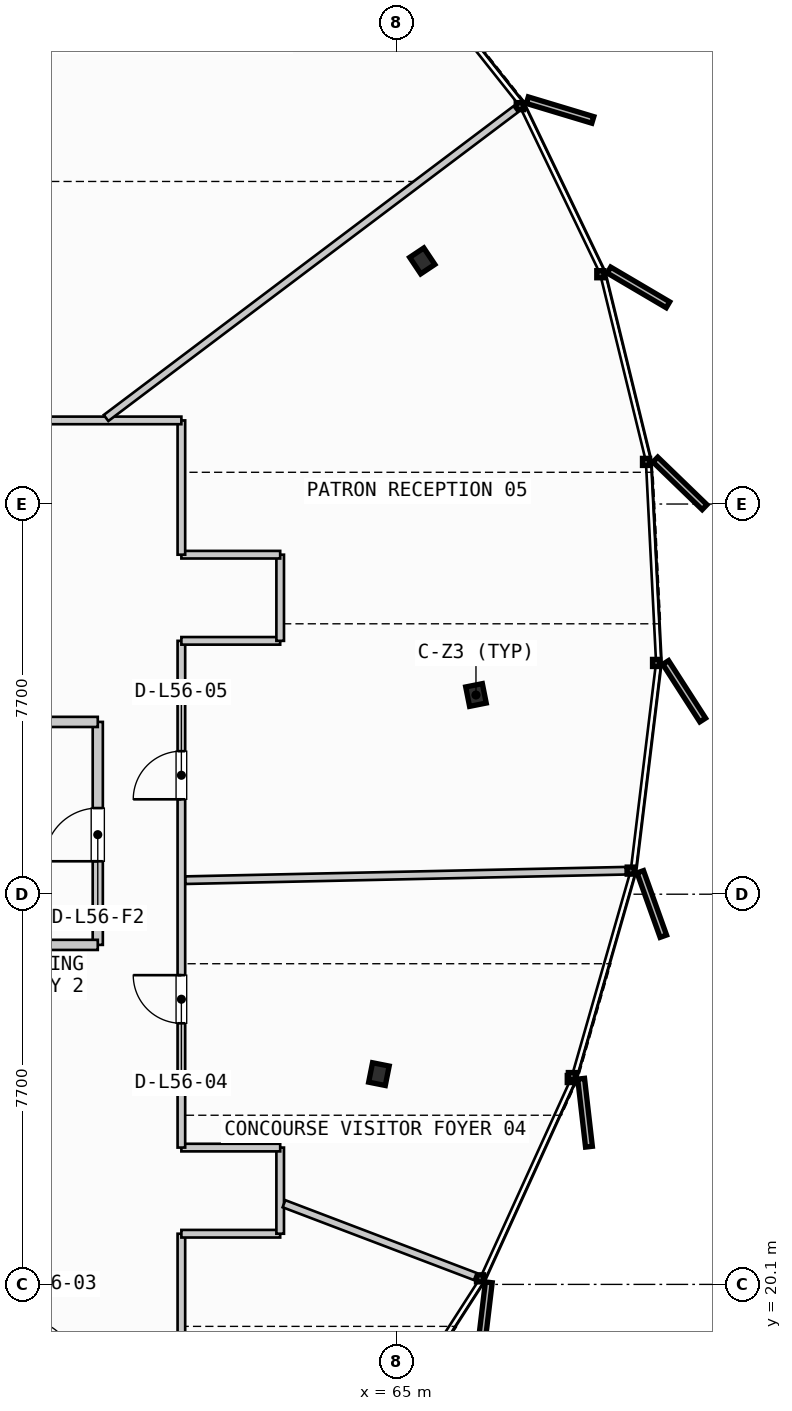
"""IFC4 building model, lengths in metres.
Left out: names, types, materials, properties, quantities, classifications, styles, units other than length and angle.
Written with IfcOpenShell. Run it as: python <this file> out.ifc"""

import sys

from ifc_helpers import new_model, si_unit, direction, frame, frame_2d, origin, origin_2d, place, context, subcontext, project, spatial, rectangle, i_section, extrude, source, transform, mapped, element, fill, save


model = new_model("IFC4")
c1 = context("Model", 3, precision=1e-05, world=origin(), true_north=direction((0.0, 1.0)))
c2 = subcontext(c1, "Body", "Model", "MODEL_VIEW")
j1 = project(units=[si_unit("LENGTHUNIT", "METRE"), si_unit("PLANEANGLEUNIT", "RADIAN")], contexts=[c1])
p1 = place(None, origin())
s1 = spatial("IfcSite", under=j1, at=p1, CompositionType="ELEMENT")
p2 = place(p1, origin())
s2 = spatial("IfcBuilding", under=s1, at=p2, CompositionType="ELEMENT")
p3 = place(p2, frame((0.0, 0.0, 214.9)))
s3 = spatial("IfcBuildingStorey", under=s2, at=p3, CompositionType="ELEMENT", Elevation=214.9)
m1 = source(origin(), c2, "Body", "SweptSolid", [
    extrude(i_section(OverallWidth=0.391, OverallDepth=0.335, WebThickness=0.023, FlangeThickness=0.034, FilletRadius=0.015, at=origin_2d()), origin(), (0.0, 0.0, 1.0), 3.24),
])
for number, where, z_axis, x_axis in (
    (1, (66.564, 31.731, 0.0), (0.0, 0.0, 1.0), (0.981, 0.195, 0.0)),
    (2, (65.504, 40.298, 0.0), (0.0, 0.0, 1.0), (0.831, 0.556, 0.0)),
    (3, (64.649, 24.25, 0.0), (0.0, 0.0, 1.0), (0.981, -0.195, 0.0)),
):
    element("IfcColumn", number, at=place(p3, frame(where, z_axis=z_axis, x_axis=x_axis)), inside=s3, PredefinedType="COLUMN", context=c2, shape_type="MappedRepresentation", body=[
        mapped(m1, transform((0.0, 0.0, 0.0), scale=1.0)),
    ])
p4 = place(p3, frame((59.1, 26.8, 0.0), z_axis=(0.0, 0.0, 1.0), x_axis=(0.0, 1.0, 0.0)))
e4 = element("IfcWall", 4, at=p4, inside=s3, PredefinedType="PARTITIONING", context=c2, shape_type="SweptSolid", body=[
    extrude(rectangle(XDim=4.4, YDim=0.2, at=frame_2d((2.2, 0.0))), origin(), (0.0, 0.0, 1.0), 2.295),
])
p5 = place(p4, frame((1.65, 0.0, 0.0)))
e5 = element("IfcOpeningElement", 5, at=p5, cuts=e4, PredefinedType="OPENING", context=c2, shape_type="SweptSolid", body=[
    extrude(rectangle(XDim=1.05, YDim=2.15, at=frame_2d((0.525, 1.075))), frame((0.0, 0.11, 0.0), z_axis=(0.0, -1.0, 0.0), x_axis=(1.0, 0.0, 0.0)), (0.0, 0.0, 1.0), 0.22),
])
for number, where, z_axis, x_axis in (
    (6, (55.885, 26.8, 0.0), (0.0, 0.0, 1.0), (1.0, 0.0, 0.0)),
    (7, (55.885, 31.2, 0.0), (0.0, 0.0, 1.0), (1.0, 0.0, 0.0)),
):
    element("IfcWall", number, at=place(p3, frame(where, z_axis=z_axis, x_axis=x_axis)), inside=s3, PredefinedType="PARTITIONING", context=c2, shape_type="SweptSolid", body=[
        extrude(rectangle(XDim=3.215, YDim=0.2, at=frame_2d((1.607, 0.0))), origin(), (0.0, 0.0, 1.0), 2.295),
    ])
p6 = place(p3, frame((60.75, 18.45, 0.0), z_axis=(0.0, 0.0, 1.0), x_axis=(0.0, 1.0, 0.0)))
e8 = element("IfcWall", 8, at=p6, inside=s3, PredefinedType="PARTITIONING", context=c2, shape_type="SweptSolid", body=[
    extrude(rectangle(XDim=2.65, YDim=0.15, at=frame_2d((1.325, 0.0))), origin(), (0.0, 0.0, 1.0), 2.295),
])
p7 = place(p3, frame((60.75, 21.1, 0.0), z_axis=(0.0, 0.0, 1.0), x_axis=(1.0, 0.0, 0.0)))
e9 = element("IfcWall", 9, at=p7, inside=s3, PredefinedType="PARTITIONING", context=c2, shape_type="SweptSolid", body=[
    extrude(rectangle(XDim=1.95, YDim=0.15, at=frame_2d((0.975, 0.0))), origin(), (0.0, 0.0, 1.0), 2.295),
])
p8 = place(p3, frame((62.7, 21.1, 0.0), z_axis=(0.0, 0.0, 1.0), x_axis=(0.0, 1.0, 0.0)))
e10 = element("IfcWall", 10, at=p8, inside=s3, PredefinedType="PARTITIONING", context=c2, shape_type="SweptSolid", body=[
    extrude(rectangle(XDim=1.7, YDim=0.15, at=frame_2d((0.85, 0.0))), origin(), (0.0, 0.0, 1.0), 2.295),
])
p9 = place(p3, frame((62.7, 22.8, 0.0), z_axis=(0.0, 0.0, 1.0), x_axis=(-1.0, 0.0, 0.0)))
e11 = element("IfcWall", 11, at=p9, inside=s3, PredefinedType="PARTITIONING", context=c2, shape_type="SweptSolid", body=[
    extrude(rectangle(XDim=1.95, YDim=0.15, at=frame_2d((0.975, 0.0))), origin(), (0.0, 0.0, 1.0), 2.295),
])
p10 = place(p3, frame((60.75, 22.8, 0.0), z_axis=(0.0, 0.0, 1.0), x_axis=(0.0, 1.0, 0.0)))
e12 = element("IfcWall", 12, at=p10, inside=s3, PredefinedType="PARTITIONING", context=c2, shape_type="SweptSolid", body=[
    extrude(rectangle(XDim=10.0, YDim=0.15, at=frame_2d((5.0, 0.0))), origin(), (0.0, 0.0, 1.0), 2.295),
])
p11 = place(p10, frame((2.453, 0.0, 0.0)))
e13 = element("IfcOpeningElement", 13, at=p11, cuts=e12, PredefinedType="OPENING", context=c2, shape_type="SweptSolid", body=[
    extrude(rectangle(XDim=0.95, YDim=2.15, at=frame_2d((0.475, 1.075))), frame((0.0, 0.085, 0.0), z_axis=(0.0, -1.0, 0.0), x_axis=(1.0, 0.0, 0.0)), (0.0, 0.0, 1.0), 0.17),
])
p12 = place(p10, frame((6.873, 0.0, 0.0)))
e14 = element("IfcOpeningElement", 14, at=p12, cuts=e12, PredefinedType="OPENING", context=c2, shape_type="SweptSolid", body=[
    extrude(rectangle(XDim=0.95, YDim=2.15, at=frame_2d((0.475, 1.075))), frame((0.0, 0.085, 0.0), z_axis=(0.0, -1.0, 0.0), x_axis=(1.0, 0.0, 0.0)), (0.0, 0.0, 1.0), 0.17),
])
p13 = place(p3, frame((60.75, 32.8, 0.0), z_axis=(0.0, 0.0, 1.0), x_axis=(1.0, 0.0, 0.0)))
e15 = element("IfcWall", 15, at=p13, inside=s3, PredefinedType="PARTITIONING", context=c2, shape_type="SweptSolid", body=[
    extrude(rectangle(XDim=1.95, YDim=0.15, at=frame_2d((0.975, 0.0))), origin(), (0.0, 0.0, 1.0), 2.295),
])
p14 = place(p3, frame((62.7, 32.8, 0.0), z_axis=(0.0, 0.0, 1.0), x_axis=(0.0, 1.0, 0.0)))
e16 = element("IfcWall", 16, at=p14, inside=s3, PredefinedType="PARTITIONING", context=c2, shape_type="SweptSolid", body=[
    extrude(rectangle(XDim=1.7, YDim=0.15, at=frame_2d((0.85, 0.0))), origin(), (0.0, 0.0, 1.0), 2.295),
])
p15 = place(p3, frame((62.7, 34.5, 0.0), z_axis=(0.0, 0.0, 1.0), x_axis=(-1.0, 0.0, 0.0)))
e17 = element("IfcWall", 17, at=p15, inside=s3, PredefinedType="PARTITIONING", context=c2, shape_type="SweptSolid", body=[
    extrude(rectangle(XDim=1.95, YDim=0.15, at=frame_2d((0.975, 0.0))), origin(), (0.0, 0.0, 1.0), 2.295),
])
p16 = place(p3, frame((60.75, 34.5, 0.0), z_axis=(0.0, 0.0, 1.0), x_axis=(0.0, 1.0, 0.0)))
e18 = element("IfcWall", 18, at=p16, inside=s3, PredefinedType="PARTITIONING", context=c2, shape_type="SweptSolid", body=[
    extrude(rectangle(XDim=2.65, YDim=0.15, at=frame_2d((1.325, 0.0))), origin(), (0.0, 0.0, 1.0), 2.295),
])
p17 = place(p3, frame((60.75, 37.15, 0.0), z_axis=(0.0, 0.0, 1.0), x_axis=(-1.0, 0.0, 0.0)))
e19 = element("IfcWall", 19, at=p17, inside=s3, PredefinedType="PARTITIONING", context=c2, shape_type="SweptSolid", body=[
    extrude(rectangle(XDim=28.35, YDim=0.15, at=frame_2d((14.175, 0.0))), origin(), (0.0, 0.0, 1.0), 2.295),
])
p18 = place(p17, frame((5.46, 0.0, 0.0)))
e20 = element("IfcOpeningElement", 20, at=p18, cuts=e19, PredefinedType="OPENING", context=c2, shape_type="SweptSolid", body=[
    extrude(rectangle(XDim=0.95, YDim=2.15, at=frame_2d((0.475, 1.075))), frame((0.0, 0.085, 0.0), z_axis=(0.0, -1.0, 0.0), x_axis=(1.0, 0.0, 0.0)), (0.0, 0.0, 1.0), 0.17),
])
p19 = place(p17, frame((13.541, 0.0, 0.0)))
e21 = element("IfcOpeningElement", 21, at=p19, cuts=e19, PredefinedType="OPENING", context=c2, shape_type="SweptSolid", body=[
    extrude(rectangle(XDim=0.95, YDim=2.15, at=frame_2d((0.475, 1.075))), frame((0.0, 0.085, 0.0), z_axis=(0.0, -1.0, 0.0), x_axis=(1.0, 0.0, 0.0)), (0.0, 0.0, 1.0), 0.17),
])
p20 = place(p17, frame((22.173, 0.0, 0.0)))
e22 = element("IfcOpeningElement", 22, at=p20, cuts=e19, PredefinedType="OPENING", context=c2, shape_type="SweptSolid", body=[
    extrude(rectangle(XDim=0.95, YDim=2.15, at=frame_2d((0.475, 1.075))), frame((0.0, 0.085, 0.0), z_axis=(0.0, -1.0, 0.0), x_axis=(1.0, 0.0, 0.0)), (0.0, 0.0, 1.0), 0.17),
])
p21 = place(p3, frame((62.775, 21.692, 0.0), z_axis=(0.0, 0.0, 1.0), x_axis=(0.934616919039, -0.355656034177, 0.0)))
e23 = element("IfcWall", 23, at=p21, inside=s3, PredefinedType="PARTITIONING", context=c2, shape_type="SweptSolid", body=[
    extrude(rectangle(XDim=4.04, YDim=0.15, at=frame_2d((2.02, 0.0))), origin(), (0.0, 0.0, 1.0), 2.295),
])
p22 = place(p3, frame((60.83, 28.077, 0.0), z_axis=(0.0, 0.0, 1.0), x_axis=(0.999769644029, 0.02146296527, 0.0)))
e24 = element("IfcWall", 24, at=p22, inside=s3, PredefinedType="PARTITIONING", context=c2, shape_type="SweptSolid", body=[
    extrude(rectangle(XDim=8.69, YDim=0.15, at=frame_2d((4.345, 0.0))), origin(), (0.0, 0.0, 1.0), 2.295),
])
p23 = place(p3, frame((59.263, 37.198, 0.0), z_axis=(0.0, 0.0, 1.0), x_axis=(0.798603092388, 0.601858040428, 0.0)))
e25 = element("IfcWall", 25, at=p23, inside=s3, PredefinedType="PARTITIONING", context=c2, shape_type="SweptSolid", body=[
    extrude(rectangle(XDim=10.125, YDim=0.15, at=frame_2d((5.062, 0.0))), origin(), (0.0, 0.0, 1.0), 2.295),
])
m2 = source(origin(), c2, "Body", "SweptSolid", [
    extrude(rectangle(XDim=1.05, YDim=2.15, at=frame_2d((0.525, 1.075))), frame((0.0, 0.025, 0.0), z_axis=(0.0, -1.0, 0.0), x_axis=(1.0, 0.0, 0.0)), (0.0, 0.0, 1.0), 0.05),
])
p24 = place(p5, origin())
e26 = element("IfcDoor", 26, at=p24, inside=s3, OperationType="SINGLE_SWING_LEFT", PredefinedType="DOOR", context=c2, shape_type="MappedRepresentation", body=[
    mapped(m2, transform((0.0, 0.0, 0.0), scale=1.0)),
])
fill(e5, e26)
m3 = source(origin(), c2, "Body", "SweptSolid", [
    extrude(rectangle(XDim=0.95, YDim=2.15, at=frame_2d((0.475, 1.075))), frame((0.0, 0.025, 0.0), z_axis=(0.0, -1.0, 0.0), x_axis=(1.0, 0.0, 0.0)), (0.0, 0.0, 1.0), 0.05),
])
p25 = place(p11, origin())
e27 = element("IfcDoor", 27, at=p25, inside=s3, OperationType="SINGLE_SWING_RIGHT", PredefinedType="DOOR", context=c2, shape_type="MappedRepresentation", body=[
    mapped(m3, transform((0.0, 0.0, 0.0), scale=1.0)),
])
fill(e13, e27)
p26 = place(p12, origin())
e28 = element("IfcDoor", 28, at=p26, inside=s3, OperationType="SINGLE_SWING_LEFT", PredefinedType="DOOR", context=c2, shape_type="MappedRepresentation", body=[
    mapped(m3, transform((0.0, 0.0, 0.0), scale=1.0)),
])
fill(e14, e28)
save(model, sys.argv[1])
